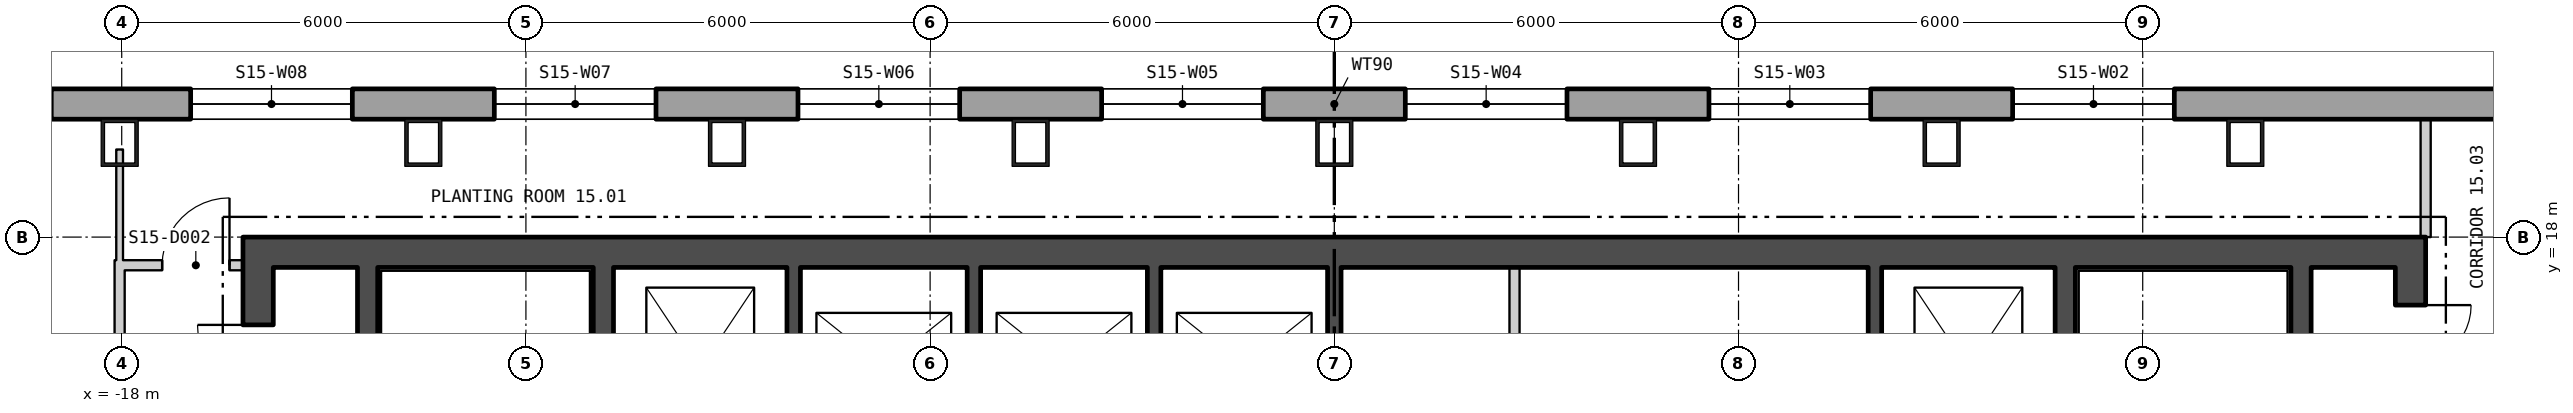
"""IFC4 building model, lengths in metres.
Left out: names, types, materials, properties, quantities, classifications, styles, units other than length and angle.
Written with IfcOpenShell. Run it as: python <this file> out.ifc"""

import sys

from ifc_helpers import new_model, si_unit, direction, frame, frame_2d, origin, origin_2d, place, context, subcontext, project, spatial, polyline, rectangle, hollow_rectangle, outline, extrude, element, fill, save


model = new_model("IFC4")
c1 = context("Model", 3, precision=1e-05, world=origin(), true_north=direction((0.0, 1.0)))
c2 = subcontext(c1, "Body", "Model", "MODEL_VIEW")
j1 = project(units=[si_unit("LENGTHUNIT", "METRE"), si_unit("PLANEANGLEUNIT", "RADIAN")], contexts=[c1])
p1 = place(None, origin())
s1 = spatial("IfcSite", under=j1, at=p1, CompositionType="ELEMENT")
p2 = place(p1, origin())
s2 = spatial("IfcBuilding", under=s1, at=p2, CompositionType="ELEMENT")
p3 = place(p2, frame((0.0, 0.0, 204.3)))
s3 = spatial("IfcBuildingStorey", under=s2, at=p3, CompositionType="ELEMENT", Elevation=204.3)
for number, where, z_axis, x_axis in (
    (1, (13.523, 19.4, 0.0), (0.0, 0.0, 1.0), (-1.0, 0.0, 0.0)),
    (2, (9.015, 19.4, 0.0), (0.0, 0.0, 1.0), (-1.0, 0.0, 0.0)),
    (3, (4.508, 19.4, 0.0), (0.0, 0.0, 1.0), (-1.0, 0.0, 0.0)),
    (4, (0.0, 19.4, 0.0), (0.0, 0.0, 1.0), (-1.0, 0.0, 0.0)),
    (5, (-4.508, 19.4, 0.0), (0.0, 0.0, 1.0), (-1.0, 0.0, 0.0)),
    (6, (-9.015, 19.4, 0.0), (0.0, 0.0, 1.0), (-1.0, 0.0, 0.0)),
    (7, (-13.523, 19.4, 0.0), (0.0, 0.0, 1.0), (-1.0, 0.0, 0.0)),
    (8, (-18.03, 19.4, 0.0), (0.0, 0.0, 1.0), (-1.0, 0.0, 0.0)),
):
    element("IfcColumn", number, at=place(p3, frame(where, z_axis=z_axis, x_axis=x_axis)), inside=s3, PredefinedType="COLUMN", context=c2, shape_type="SweptSolid", body=[
        extrude(hollow_rectangle(XDim=0.55, YDim=0.7, WallThickness=0.05, at=origin_2d()), origin(), (0.0, 0.0, 1.0), 3.9),
    ])
p4 = place(p3, frame((22.87, 19.975, -0.4), z_axis=(0.0, 0.0, 1.0), x_axis=(-1.0, 0.0, 0.0)))
e9 = element("IfcWall", 9, at=p4, inside=s3, PredefinedType="SOLIDWALL", context=c2, shape_type="SweptSolid", body=[
    extrude(outline(polyline([(-0.13, -0.225), (45.87, -0.225), (45.61, 0.225), (0.13, 0.225), (-0.13, -0.225)])), origin(), (0.0, 0.0, 1.0), 3.9),
])
p5 = place(p4, frame((1.424, 0.0, 1.3)))
e10 = element("IfcOpeningElement", 10, at=p5, cuts=e9, PredefinedType="OPENING", context=c2, shape_type="SweptSolid", body=[
    extrude(rectangle(XDim=2.4, YDim=2.0, at=frame_2d((1.2, 1.0))), frame((0.0, 0.235, 0.0), z_axis=(0.0, -1.0, 0.0), x_axis=(1.0, 0.0, 0.0)), (0.0, 0.0, 1.0), 0.47),
])
p6 = place(p4, frame((10.401, 0.0, 1.3)))
e11 = element("IfcOpeningElement", 11, at=p6, cuts=e9, PredefinedType="OPENING", context=c2, shape_type="SweptSolid", body=[
    extrude(rectangle(XDim=2.4, YDim=2.0, at=frame_2d((1.2, 1.0))), frame((0.0, 0.235, 0.0), z_axis=(0.0, -1.0, 0.0), x_axis=(1.0, 0.0, 0.0)), (0.0, 0.0, 1.0), 0.47),
])
p7 = place(p4, frame((14.909, 0.0, 1.3)))
e12 = element("IfcOpeningElement", 12, at=p7, cuts=e9, PredefinedType="OPENING", context=c2, shape_type="SweptSolid", body=[
    extrude(rectangle(XDim=2.4, YDim=2.0, at=frame_2d((1.2, 1.0))), frame((0.0, 0.235, 0.0), z_axis=(0.0, -1.0, 0.0), x_axis=(1.0, 0.0, 0.0)), (0.0, 0.0, 1.0), 0.47),
])
p8 = place(p4, frame((19.416, 0.0, 1.3)))
e13 = element("IfcOpeningElement", 13, at=p8, cuts=e9, PredefinedType="OPENING", context=c2, shape_type="SweptSolid", body=[
    extrude(rectangle(XDim=2.4, YDim=2.0, at=frame_2d((1.2, 1.0))), frame((0.0, 0.235, 0.0), z_axis=(0.0, -1.0, 0.0), x_axis=(1.0, 0.0, 0.0)), (0.0, 0.0, 1.0), 0.47),
])
p9 = place(p4, frame((23.924, 0.0, 1.3)))
e14 = element("IfcOpeningElement", 14, at=p9, cuts=e9, PredefinedType="OPENING", context=c2, shape_type="SweptSolid", body=[
    extrude(rectangle(XDim=2.4, YDim=2.0, at=frame_2d((1.2, 1.0))), frame((0.0, 0.235, 0.0), z_axis=(0.0, -1.0, 0.0), x_axis=(1.0, 0.0, 0.0)), (0.0, 0.0, 1.0), 0.47),
])
p10 = place(p4, frame((28.431, 0.0, 1.3)))
e15 = element("IfcOpeningElement", 15, at=p10, cuts=e9, PredefinedType="OPENING", context=c2, shape_type="SweptSolid", body=[
    extrude(rectangle(XDim=2.4, YDim=2.0, at=frame_2d((1.2, 1.0))), frame((0.0, 0.235, 0.0), z_axis=(0.0, -1.0, 0.0), x_axis=(1.0, 0.0, 0.0)), (0.0, 0.0, 1.0), 0.47),
])
p11 = place(p4, frame((32.939, 0.0, 1.3)))
e16 = element("IfcOpeningElement", 16, at=p11, cuts=e9, PredefinedType="OPENING", context=c2, shape_type="SweptSolid", body=[
    extrude(rectangle(XDim=2.4, YDim=2.0, at=frame_2d((1.2, 1.0))), frame((0.0, 0.235, 0.0), z_axis=(0.0, -1.0, 0.0), x_axis=(1.0, 0.0, 0.0)), (0.0, 0.0, 1.0), 0.47),
])
p12 = place(p4, frame((37.447, 0.0, 1.3)))
e17 = element("IfcOpeningElement", 17, at=p12, cuts=e9, PredefinedType="OPENING", context=c2, shape_type="SweptSolid", body=[
    extrude(rectangle(XDim=2.4, YDim=2.0, at=frame_2d((1.2, 1.0))), frame((0.0, 0.235, 0.0), z_axis=(0.0, -1.0, 0.0), x_axis=(1.0, 0.0, 0.0)), (0.0, 0.0, 1.0), 0.47),
])
p13 = place(p4, frame((41.916, 0.0, 1.3)))
e18 = element("IfcOpeningElement", 18, at=p13, cuts=e9, PredefinedType="OPENING", context=c2, shape_type="SweptSolid", body=[
    extrude(rectangle(XDim=2.4, YDim=2.0, at=frame_2d((1.2, 1.0))), frame((0.0, 0.235, 0.0), z_axis=(0.0, -1.0, 0.0), x_axis=(1.0, 0.0, 0.0)), (0.0, 0.0, 1.0), 0.47),
])
p14 = place(p3, frame((-16.2, 17.775, 0.0), z_axis=(0.0, 0.0, 1.0), x_axis=(1.0, 0.0, 0.0)))
e19 = element("IfcWall", 19, at=p14, inside=s3, PredefinedType="SHEAR", context=c2, shape_type="SweptSolid", body=[
    extrude(rectangle(XDim=32.4, YDim=0.45, at=frame_2d((16.2, 0.0))), origin(), (0.0, 0.0, 1.0), 3.7),
])
p15 = place(p3, frame((-15.975, 2.45, 0.0), z_axis=(0.0, 0.0, 1.0), x_axis=(0.0, 1.0, 0.0)))
e20 = element("IfcWall", 20, at=p15, inside=s3, PredefinedType="SHEAR", context=c2, shape_type="SweptSolid", body=[
    extrude(rectangle(XDim=15.1, YDim=0.45, at=frame_2d((7.55, 0.0))), origin(), (0.0, 0.0, 1.0), 3.7),
])
p16 = place(p15, frame((4.4, 0.0, 0.0)))
e21 = element("IfcOpeningElement", 21, at=p16, cuts=e20, PredefinedType="OPENING", context=c2, shape_type="SweptSolid", body=[
    extrude(rectangle(XDim=1.5, YDim=2.1, at=frame_2d((0.75, 1.05))), frame((0.0, 0.235, 0.0), z_axis=(0.0, -1.0, 0.0), x_axis=(1.0, 0.0, 0.0)), (0.0, 0.0, 1.0), 0.47),
])
p17 = place(p15, frame((0.556, 0.0, 0.0)))
e22 = element("IfcOpeningElement", 22, at=p17, cuts=e20, PredefinedType="OPENING", context=c2, shape_type="SweptSolid", body=[
    extrude(rectangle(XDim=0.9, YDim=2.1, at=frame_2d((0.45, 1.05))), frame((0.0, 0.235, 0.0), z_axis=(0.0, -1.0, 0.0), x_axis=(1.0, 0.0, 0.0)), (0.0, 0.0, 1.0), 0.47),
])
p18 = place(p15, frame((2.756, 0.0, 0.0)))
e23 = element("IfcOpeningElement", 23, at=p18, cuts=e20, PredefinedType="OPENING", context=c2, shape_type="SweptSolid", body=[
    extrude(rectangle(XDim=0.9, YDim=2.1, at=frame_2d((0.45, 1.05))), frame((0.0, 0.235, 0.0), z_axis=(0.0, -1.0, 0.0), x_axis=(1.0, 0.0, 0.0)), (0.0, 0.0, 1.0), 0.47),
])
p19 = place(p15, frame((6.76, 0.0, 0.0)))
e24 = element("IfcOpeningElement", 24, at=p19, cuts=e20, PredefinedType="OPENING", context=c2, shape_type="SweptSolid", body=[
    extrude(rectangle(XDim=1.0, YDim=2.1, at=frame_2d((0.5, 1.05))), frame((0.0, 0.235, 0.0), z_axis=(0.0, -1.0, 0.0), x_axis=(1.0, 0.0, 0.0)), (0.0, 0.0, 1.0), 0.47),
])
p20 = place(p15, frame((10.032, 0.0, 0.0)))
e25 = element("IfcOpeningElement", 25, at=p20, cuts=e20, PredefinedType="OPENING", context=c2, shape_type="SweptSolid", body=[
    extrude(rectangle(XDim=0.9, YDim=2.1, at=frame_2d((0.45, 1.05))), frame((0.0, 0.235, 0.0), z_axis=(0.0, -1.0, 0.0), x_axis=(1.0, 0.0, 0.0)), (0.0, 0.0, 1.0), 0.47),
])
p21 = place(p15, frame((13.347, 0.0, 0.0)))
e26 = element("IfcOpeningElement", 26, at=p21, cuts=e20, PredefinedType="OPENING", context=c2, shape_type="SweptSolid", body=[
    extrude(rectangle(XDim=0.9, YDim=2.1, at=frame_2d((0.45, 1.05))), frame((0.0, 0.235, 0.0), z_axis=(0.0, -1.0, 0.0), x_axis=(1.0, 0.0, 0.0)), (0.0, 0.0, 1.0), 0.47),
])
p22 = place(p3, frame((15.975, 2.45, 0.0), z_axis=(0.0, 0.0, 1.0), x_axis=(0.0, 1.0, 0.0)))
e27 = element("IfcWall", 27, at=p22, inside=s3, PredefinedType="SHEAR", context=c2, shape_type="SweptSolid", body=[
    extrude(rectangle(XDim=15.1, YDim=0.45, at=frame_2d((7.55, 0.0))), origin(), (0.0, 0.0, 1.0), 3.7),
])
p23 = place(p22, frame((4.4, 0.0, 0.0)))
e28 = element("IfcOpeningElement", 28, at=p23, cuts=e27, PredefinedType="OPENING", context=c2, shape_type="SweptSolid", body=[
    extrude(rectangle(XDim=1.5, YDim=2.1, at=frame_2d((0.75, 1.05))), frame((0.0, 0.235, 0.0), z_axis=(0.0, -1.0, 0.0), x_axis=(1.0, 0.0, 0.0)), (0.0, 0.0, 1.0), 0.47),
])
p24 = place(p22, frame((0.4, 0.0, 0.0)))
e29 = element("IfcOpeningElement", 29, at=p24, cuts=e27, PredefinedType="OPENING", context=c2, shape_type="SweptSolid", body=[
    extrude(rectangle(XDim=0.9, YDim=2.1, at=frame_2d((0.45, 1.05))), frame((0.0, 0.235, 0.0), z_axis=(0.0, -1.0, 0.0), x_axis=(1.0, 0.0, 0.0)), (0.0, 0.0, 1.0), 0.47),
])
p25 = place(p22, frame((2.5, 0.0, 0.0)))
e30 = element("IfcOpeningElement", 30, at=p25, cuts=e27, PredefinedType="OPENING", context=c2, shape_type="SweptSolid", body=[
    extrude(rectangle(XDim=0.9, YDim=2.1, at=frame_2d((0.45, 1.05))), frame((0.0, 0.235, 0.0), z_axis=(0.0, -1.0, 0.0), x_axis=(1.0, 0.0, 0.0)), (0.0, 0.0, 1.0), 0.47),
])
p26 = place(p22, frame((6.728, 0.0, 0.0)))
e31 = element("IfcOpeningElement", 31, at=p26, cuts=e27, PredefinedType="OPENING", context=c2, shape_type="SweptSolid", body=[
    extrude(rectangle(XDim=1.0, YDim=2.1, at=frame_2d((0.5, 1.05))), frame((0.0, 0.235, 0.0), z_axis=(0.0, -1.0, 0.0), x_axis=(1.0, 0.0, 0.0)), (0.0, 0.0, 1.0), 0.47),
])
p27 = place(p22, frame((10.293, 0.0, 0.0)))
e32 = element("IfcOpeningElement", 32, at=p27, cuts=e27, PredefinedType="OPENING", context=c2, shape_type="SweptSolid", body=[
    extrude(rectangle(XDim=0.9, YDim=2.1, at=frame_2d((0.45, 1.05))), frame((0.0, 0.235, 0.0), z_axis=(0.0, -1.0, 0.0), x_axis=(1.0, 0.0, 0.0)), (0.0, 0.0, 1.0), 0.47),
])
p28 = place(p22, frame((13.64, 0.0, 0.0)))
e33 = element("IfcOpeningElement", 33, at=p28, cuts=e27, PredefinedType="OPENING", context=c2, shape_type="SweptSolid", body=[
    extrude(rectangle(XDim=0.9, YDim=2.1, at=frame_2d((0.45, 1.05))), frame((0.0, 0.235, 0.0), z_axis=(0.0, -1.0, 0.0), x_axis=(1.0, 0.0, 0.0)), (0.0, 0.0, 1.0), 0.47),
])
p29 = place(p3, frame((-10.85, 2.45, 0.0), z_axis=(0.0, 0.0, 1.0), x_axis=(0.0, 1.0, 0.0)))
e34 = element("IfcWall", 34, at=p29, inside=s3, PredefinedType="SHEAR", context=c2, shape_type="SweptSolid", body=[
    extrude(rectangle(XDim=15.1, YDim=0.3, at=frame_2d((7.55, 0.0))), origin(), (0.0, 0.0, 1.0), 3.7),
])
p30 = place(p29, frame((3.525, 0.0, 0.0)))
e35 = element("IfcOpeningElement", 35, at=p30, cuts=e34, PredefinedType="OPENING", context=c2, shape_type="SweptSolid", body=[
    extrude(rectangle(XDim=1.25, YDim=2.1, at=frame_2d((0.625, 1.05))), frame((0.0, 0.16, 0.0), z_axis=(0.0, -1.0, 0.0), x_axis=(1.0, 0.0, 0.0)), (0.0, 0.0, 1.0), 0.32),
])
p31 = place(p29, frame((1.15, 0.0, 0.0)))
e36 = element("IfcOpeningElement", 36, at=p31, cuts=e34, PredefinedType="OPENING", context=c2, shape_type="SweptSolid", body=[
    extrude(rectangle(XDim=1.0, YDim=2.1, at=frame_2d((0.5, 1.05))), frame((0.0, 0.16, 0.0), z_axis=(0.0, -1.0, 0.0), x_axis=(1.0, 0.0, 0.0)), (0.0, 0.0, 1.0), 0.32),
])
p32 = place(p3, frame((-14.35, 2.45, 0.0), z_axis=(0.0, 0.0, 1.0), x_axis=(0.0, 1.0, 0.0)))
e37 = element("IfcWall", 37, at=p32, inside=s3, PredefinedType="SHEAR", context=c2, shape_type="SweptSolid", body=[
    extrude(rectangle(XDim=15.1, YDim=0.3, at=frame_2d((7.55, 0.0))), origin(), (0.0, 0.0, 1.0), 3.7),
])
p33 = place(p32, frame((4.4, 0.0, 0.0)))
e38 = element("IfcOpeningElement", 38, at=p33, cuts=e37, PredefinedType="OPENING", context=c2, shape_type="SweptSolid", body=[
    extrude(rectangle(XDim=1.5, YDim=2.1, at=frame_2d((0.75, 1.05))), frame((0.0, 0.16, 0.0), z_axis=(0.0, -1.0, 0.0), x_axis=(1.0, 0.0, 0.0)), (0.0, 0.0, 1.0), 0.32),
])
p34 = place(p3, frame((10.85, 2.45, 0.0), z_axis=(0.0, 0.0, 1.0), x_axis=(0.0, 1.0, 0.0)))
e39 = element("IfcWall", 39, at=p34, inside=s3, PredefinedType="SHEAR", context=c2, shape_type="SweptSolid", body=[
    extrude(rectangle(XDim=15.1, YDim=0.3, at=frame_2d((7.55, 0.0))), origin(), (0.0, 0.0, 1.0), 3.7),
])
p35 = place(p34, frame((3.525, 0.0, 0.0)))
e40 = element("IfcOpeningElement", 40, at=p35, cuts=e39, PredefinedType="OPENING", context=c2, shape_type="SweptSolid", body=[
    extrude(rectangle(XDim=1.25, YDim=2.1, at=frame_2d((0.625, 1.05))), frame((0.0, 0.16, 0.0), z_axis=(0.0, -1.0, 0.0), x_axis=(1.0, 0.0, 0.0)), (0.0, 0.0, 1.0), 0.32),
])
p36 = place(p34, frame((1.15, 0.0, 0.0)))
e41 = element("IfcOpeningElement", 41, at=p36, cuts=e39, PredefinedType="OPENING", context=c2, shape_type="SweptSolid", body=[
    extrude(rectangle(XDim=1.0, YDim=2.1, at=frame_2d((0.5, 1.05))), frame((0.0, 0.16, 0.0), z_axis=(0.0, -1.0, 0.0), x_axis=(1.0, 0.0, 0.0)), (0.0, 0.0, 1.0), 0.32),
])
p37 = place(p3, frame((14.35, 2.45, 0.0), z_axis=(0.0, 0.0, 1.0), x_axis=(0.0, 1.0, 0.0)))
e42 = element("IfcWall", 42, at=p37, inside=s3, PredefinedType="SHEAR", context=c2, shape_type="SweptSolid", body=[
    extrude(rectangle(XDim=15.1, YDim=0.3, at=frame_2d((7.55, 0.0))), origin(), (0.0, 0.0, 1.0), 3.7),
])
p38 = place(p37, frame((4.4, 0.0, 0.0)))
e43 = element("IfcOpeningElement", 43, at=p38, cuts=e42, PredefinedType="OPENING", context=c2, shape_type="SweptSolid", body=[
    extrude(rectangle(XDim=1.5, YDim=2.1, at=frame_2d((0.75, 1.05))), frame((0.0, 0.16, 0.0), z_axis=(0.0, -1.0, 0.0), x_axis=(1.0, 0.0, 0.0)), (0.0, 0.0, 1.0), 0.32),
])
for number, where, z_axis, x_axis in (
    (44, (-8.025, 14.7, 0.0), (0.0, 0.0, 1.0), (0.0, 1.0, 0.0)),
    (45, (-5.35, 14.7, 0.0), (0.0, 0.0, 1.0), (0.0, 1.0, 0.0)),
    (46, (-2.675, 14.7, 0.0), (0.0, 0.0, 1.0), (0.0, 1.0, 0.0)),
    (47, (0.0, 14.7, 0.0), (0.0, 0.0, 1.0), (0.0, 1.0, 0.0)),
):
    element("IfcWall", number, at=place(p3, frame(where, z_axis=z_axis, x_axis=x_axis)), inside=s3, PredefinedType="SHEAR", context=c2, shape_type="SweptSolid", body=[
        extrude(rectangle(XDim=2.85, YDim=0.2, at=frame_2d((1.425, 0.0))), origin(), (0.0, 0.0, 1.0), 3.7),
    ])
p39 = place(p3, frame((2.675, 14.7, 0.0), z_axis=(0.0, 0.0, 1.0), x_axis=(0.0, 1.0, 0.0)))
e48 = element("IfcWall", 48, at=p39, inside=s3, PredefinedType="PARTITIONING", context=c2, shape_type="SweptSolid", body=[
    extrude(rectangle(XDim=2.85, YDim=0.15, at=frame_2d((1.425, 0.0))), origin(), (0.0, 0.0, 1.0), 3.7),
])
p40 = place(p3, frame((8.025, 14.7, 0.0), z_axis=(0.0, 0.0, 1.0), x_axis=(0.0, 1.0, 0.0)))
e49 = element("IfcWall", 49, at=p40, inside=s3, PredefinedType="SHEAR", context=c2, shape_type="SweptSolid", body=[
    extrude(rectangle(XDim=2.85, YDim=0.2, at=frame_2d((1.425, 0.0))), origin(), (0.0, 0.0, 1.0), 3.7),
])
p41 = place(p3, frame((-18.031, 13.123, 0.0), z_axis=(0.0, 0.0, 1.0), x_axis=(0.0, 1.0, 0.0)))
e50 = element("IfcWall", 50, at=p41, inside=s3, PredefinedType="PARTITIONING", context=c2, shape_type="SweptSolid", body=[
    extrude(rectangle(XDim=4.534, YDim=0.15, at=frame_2d((2.267, 0.0))), origin(), (0.0, 0.0, 1.0), 3.7),
])
p42 = place(p41, frame((1.633, 0.0, 0.0)))
e51 = element("IfcOpeningElement", 51, at=p42, cuts=e50, PredefinedType="OPENING", context=c2, shape_type="SweptSolid", body=[
    extrude(rectangle(XDim=1.0, YDim=2.1, at=frame_2d((0.5, 1.05))), frame((0.0, 0.085, 0.0), z_axis=(0.0, -1.0, 0.0), x_axis=(1.0, 0.0, 0.0)), (0.0, 0.0, 1.0), 0.17),
])
p43 = place(p3, frame((-18.031, 17.657, 0.0), z_axis=(0.0, 0.0, 1.0), x_axis=(0.0, 1.0, 0.0)))
e52 = element("IfcWall", 52, at=p43, inside=s3, PredefinedType="PARTITIONING", context=c2, shape_type="SweptSolid", body=[
    extrude(rectangle(XDim=1.643, YDim=0.1, at=frame_2d((0.822, 0.0))), origin(), (0.0, 0.0, 1.0), 3.7),
])
p44 = place(p3, frame((-17.956, 17.582, 0.0), z_axis=(0.0, 0.0, 1.0), x_axis=(1.0, 0.0, 0.0)))
e53 = element("IfcWall", 53, at=p44, inside=s3, PredefinedType="PARTITIONING", context=c2, shape_type="SweptSolid", body=[
    extrude(rectangle(XDim=1.756, YDim=0.15, at=frame_2d((0.878, 0.0))), origin(), (0.0, 0.0, 1.0), 3.7),
])
p45 = place(p44, frame((0.556, 0.0, 0.0)))
e54 = element("IfcOpeningElement", 54, at=p45, cuts=e53, PredefinedType="OPENING", context=c2, shape_type="SweptSolid", body=[
    extrude(rectangle(XDim=1.0, YDim=2.1, at=frame_2d((0.5, 1.05))), frame((0.0, 0.085, 0.0), z_axis=(0.0, -1.0, 0.0), x_axis=(1.0, 0.0, 0.0)), (0.0, 0.0, 1.0), 0.17),
])
p46 = place(p3, frame((16.2, 18.0, 0.0), z_axis=(0.0, 0.0, 1.0), x_axis=(0.0, 1.0, 0.0)))
e55 = element("IfcWall", 55, at=p46, inside=s3, PredefinedType="PARTITIONING", context=c2, shape_type="SweptSolid", body=[
    extrude(rectangle(XDim=1.75, YDim=0.15, at=frame_2d((0.875, 0.0))), origin(), (0.0, 0.0, 1.0), 3.7),
])
p47 = place(p6, origin())
e56 = element("IfcWindow", 56, at=p47, inside=s3, PartitioningType="SINGLE_PANEL", PredefinedType="WINDOW", context=c2, shape_type="SweptSolid", body=[
    extrude(rectangle(XDim=2.4, YDim=2.0, at=frame_2d((1.2, 1.0))), frame((0.0, 0.105, 0.0), z_axis=(0.0, -1.0, 0.0), x_axis=(1.0, 0.0, 0.0)), (0.0, 0.0, 1.0), 0.06),
])
fill(e11, e56)
p48 = place(p7, origin())
e57 = element("IfcWindow", 57, at=p48, inside=s3, PartitioningType="SINGLE_PANEL", PredefinedType="WINDOW", context=c2, shape_type="SweptSolid", body=[
    extrude(rectangle(XDim=2.4, YDim=2.0, at=frame_2d((1.2, 1.0))), frame((0.0, 0.105, 0.0), z_axis=(0.0, -1.0, 0.0), x_axis=(1.0, 0.0, 0.0)), (0.0, 0.0, 1.0), 0.06),
])
fill(e12, e57)
p49 = place(p8, origin())
e58 = element("IfcWindow", 58, at=p49, inside=s3, PartitioningType="SINGLE_PANEL", PredefinedType="WINDOW", context=c2, shape_type="SweptSolid", body=[
    extrude(rectangle(XDim=2.4, YDim=2.0, at=frame_2d((1.2, 1.0))), frame((0.0, 0.105, 0.0), z_axis=(0.0, -1.0, 0.0), x_axis=(1.0, 0.0, 0.0)), (0.0, 0.0, 1.0), 0.06),
])
fill(e13, e58)
p50 = place(p9, origin())
e59 = element("IfcWindow", 59, at=p50, inside=s3, PartitioningType="SINGLE_PANEL", PredefinedType="WINDOW", context=c2, shape_type="SweptSolid", body=[
    extrude(rectangle(XDim=2.4, YDim=2.0, at=frame_2d((1.2, 1.0))), frame((0.0, 0.105, 0.0), z_axis=(0.0, -1.0, 0.0), x_axis=(1.0, 0.0, 0.0)), (0.0, 0.0, 1.0), 0.06),
])
fill(e14, e59)
p51 = place(p10, origin())
e60 = element("IfcWindow", 60, at=p51, inside=s3, PartitioningType="SINGLE_PANEL", PredefinedType="WINDOW", context=c2, shape_type="SweptSolid", body=[
    extrude(rectangle(XDim=2.4, YDim=2.0, at=frame_2d((1.2, 1.0))), frame((0.0, 0.105, 0.0), z_axis=(0.0, -1.0, 0.0), x_axis=(1.0, 0.0, 0.0)), (0.0, 0.0, 1.0), 0.06),
])
fill(e15, e60)
p52 = place(p11, origin())
e61 = element("IfcWindow", 61, at=p52, inside=s3, PartitioningType="SINGLE_PANEL", PredefinedType="WINDOW", context=c2, shape_type="SweptSolid", body=[
    extrude(rectangle(XDim=2.4, YDim=2.0, at=frame_2d((1.2, 1.0))), frame((0.0, 0.105, 0.0), z_axis=(0.0, -1.0, 0.0), x_axis=(1.0, 0.0, 0.0)), (0.0, 0.0, 1.0), 0.06),
])
fill(e16, e61)
p53 = place(p12, origin())
e62 = element("IfcWindow", 62, at=p53, inside=s3, PartitioningType="SINGLE_PANEL", PredefinedType="WINDOW", context=c2, shape_type="SweptSolid", body=[
    extrude(rectangle(XDim=2.4, YDim=2.0, at=frame_2d((1.2, 1.0))), frame((0.0, 0.105, 0.0), z_axis=(0.0, -1.0, 0.0), x_axis=(1.0, 0.0, 0.0)), (0.0, 0.0, 1.0), 0.06),
])
fill(e17, e62)
p54 = place(p21, origin())
e63 = element("IfcDoor", 63, at=p54, inside=s3, OperationType="SINGLE_SWING_LEFT", PredefinedType="DOOR", context=c2, shape_type="SweptSolid", body=[
    extrude(rectangle(XDim=0.9, YDim=2.1, at=frame_2d((0.45, 1.05))), frame((0.0, 0.025, 0.0), z_axis=(0.0, -1.0, 0.0), x_axis=(1.0, 0.0, 0.0)), (0.0, 0.0, 1.0), 0.05),
])
fill(e26, e63)
p55 = place(p28, origin())
e64 = element("IfcDoor", 64, at=p55, inside=s3, OperationType="SINGLE_SWING_RIGHT", PredefinedType="DOOR", context=c2, shape_type="SweptSolid", body=[
    extrude(rectangle(XDim=0.9, YDim=2.1, at=frame_2d((0.45, 1.05))), frame((0.0, 0.025, 0.0), z_axis=(0.0, -1.0, 0.0), x_axis=(1.0, 0.0, 0.0)), (0.0, 0.0, 1.0), 0.05),
])
fill(e33, e64)
p56 = place(p45, origin())
e65 = element("IfcDoor", 65, at=p56, inside=s3, OperationType="SINGLE_SWING_LEFT", PredefinedType="DOOR", context=c2, shape_type="SweptSolid", body=[
    extrude(rectangle(XDim=1.0, YDim=2.1, at=frame_2d((0.5, 1.05))), frame((0.0, 0.025, 0.0), z_axis=(0.0, -1.0, 0.0), x_axis=(1.0, 0.0, 0.0)), (0.0, 0.0, 1.0), 0.05),
])
fill(e54, e65)
save(model, sys.argv[1])
